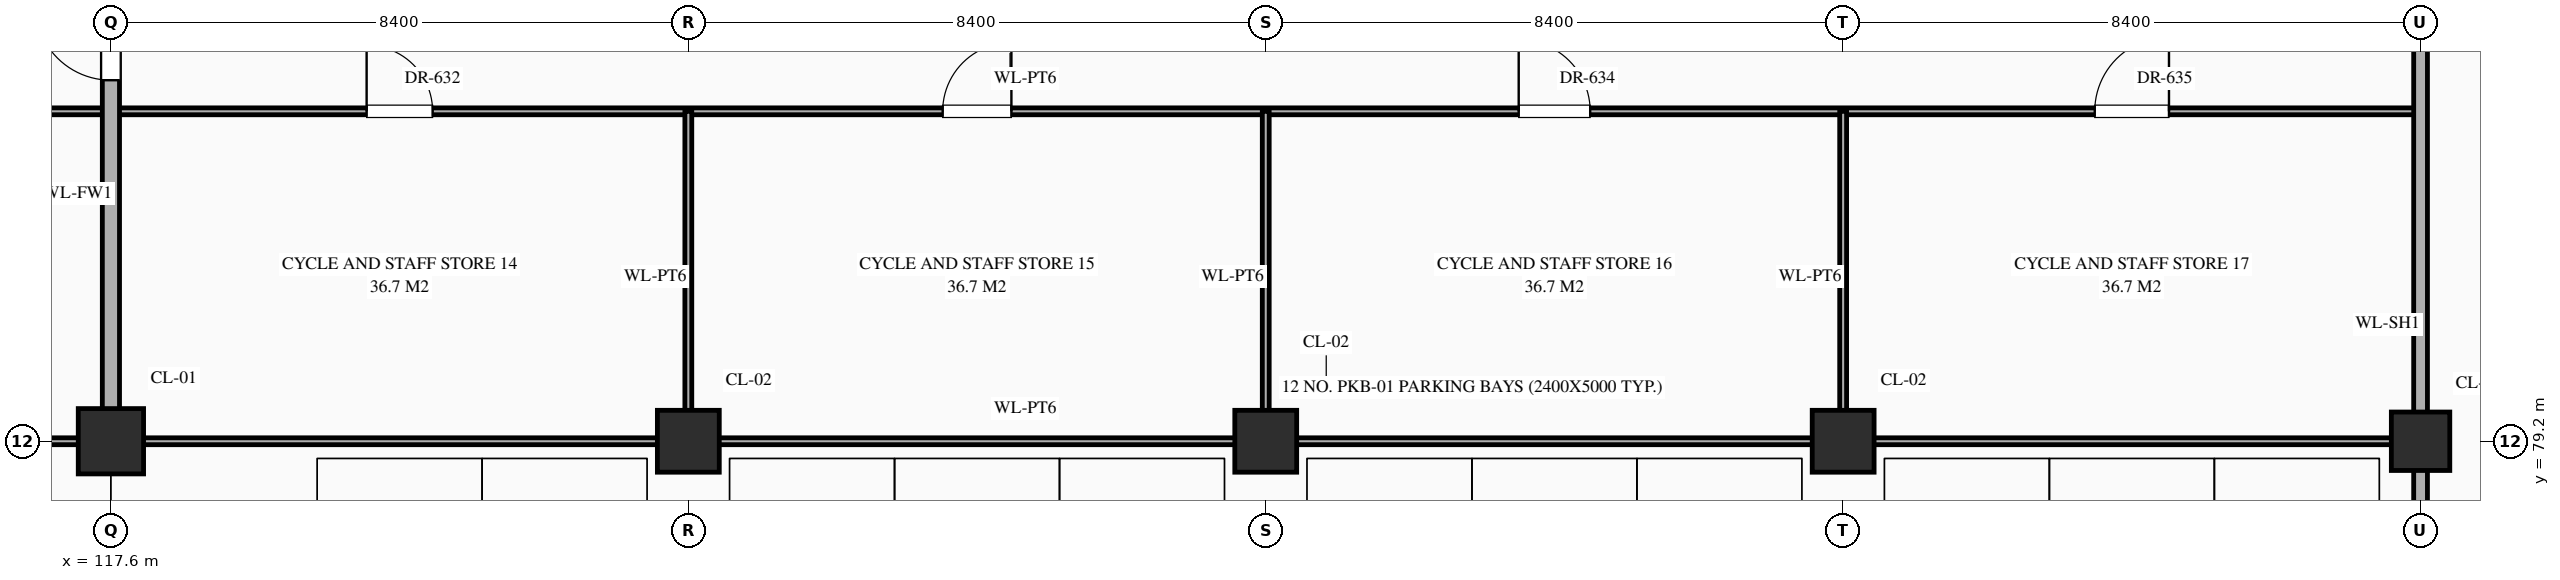
"""IFC4 building model, lengths in metres.
Left out: names, types, materials, properties, quantities, classifications, styles, units other than length and angle.
Written with IfcOpenShell. Run it as: python <this file> out.ifc"""

import sys

from ifc_helpers import new_model, si_unit, direction, frame, frame_2d, origin, origin_2d, place, context, subcontext, project, spatial, rectangle, extrude, element, fill, save


model = new_model("IFC4")
c1 = context("Model", 3, precision=1e-05, world=origin(), true_north=direction((0.0, 1.0)))
c2 = subcontext(c1, "Body", "Model", "MODEL_VIEW")
j1 = project(units=[si_unit("LENGTHUNIT", "METRE"), si_unit("PLANEANGLEUNIT", "RADIAN")], contexts=[c1])
p1 = place(None, origin())
s1 = spatial("IfcSite", under=j1, at=p1, CompositionType="ELEMENT")
p2 = place(p1, origin())
s2 = spatial("IfcBuilding", under=s1, at=p2, CompositionType="ELEMENT")
p3 = place(p2, frame((0.0, 0.0, -5.4)))
s3 = spatial("IfcBuildingStorey", under=s2, at=p3, CompositionType="ELEMENT", Elevation=-5.4)
p4 = place(p3, frame((117.6, 79.2, 0.0), z_axis=(0.0, 0.0, 1.0), x_axis=(1.0, 0.0, 0.0)))
e1 = element("IfcColumn", 1, at=p4, inside=s3, PredefinedType="COLUMN", context=c2, shape_type="SweptSolid", body=[
    extrude(rectangle(XDim=0.95, YDim=0.95, at=origin_2d()), origin(), (0.0, 0.0, 1.0), 5.4),
])
for number, where, z_axis, x_axis in (
    (2, (126.0, 79.2, 0.0), (0.0, 0.0, 1.0), (1.0, 0.0, 0.0)),
    (3, (134.4, 79.2, 0.0), (0.0, 0.0, 1.0), (1.0, 0.0, 0.0)),
    (4, (142.8, 79.2, 0.0), (0.0, 0.0, 1.0), (1.0, 0.0, 0.0)),
):
    element("IfcColumn", number, at=place(p3, frame(where, z_axis=z_axis, x_axis=x_axis)), inside=s3, PredefinedType="COLUMN", context=c2, shape_type="SweptSolid", body=[
        extrude(rectangle(XDim=0.9, YDim=0.9, at=origin_2d()), origin(), (0.0, 0.0, 1.0), 5.4),
    ])
p5 = place(p3, frame((151.2, 79.2, 0.0), z_axis=(0.0, 0.0, 1.0), x_axis=(1.0, 0.0, 0.0)))
e5 = element("IfcColumn", 5, at=p5, inside=s3, PredefinedType="COLUMN", context=c2, shape_type="SweptSolid", body=[
    extrude(rectangle(XDim=0.85, YDim=0.85, at=origin_2d()), origin(), (0.0, 0.0, 1.0), 5.4),
])
p6 = place(p3, frame((50.4, 79.2, 0.0), z_axis=(0.0, 0.0, 1.0), x_axis=(1.0, 0.0, 0.0)))
e6 = element("IfcWall", 6, at=p6, inside=s3, PredefinedType="STANDARD", context=c2, shape_type="SweptSolid", body=[
    extrude(rectangle(XDim=100.8, YDim=0.1, at=frame_2d((50.4, 0.0))), origin(), (0.0, 0.0, 1.0), 4.13),
])
p7 = place(p6, frame((28.76, 0.0, 0.0)))
e7 = element("IfcOpeningElement", 7, at=p7, cuts=e6, PredefinedType="OPENING", context=c2, shape_type="SweptSolid", body=[
    extrude(rectangle(XDim=1.28, YDim=2.35, at=frame_2d((0.64, 1.175))), frame((0.0, 0.062, 0.0), z_axis=(0.0, -1.0, 0.0), x_axis=(1.0, 0.0, 0.0)), (0.0, 0.0, 1.0), 0.124),
])
p8 = place(p3, frame((33.6, 84.0, 0.0), z_axis=(0.0, 0.0, 1.0), x_axis=(1.0, 0.0, 0.0)))
e8 = element("IfcWall", 8, at=p8, inside=s3, PredefinedType="STANDARD", context=c2, shape_type="SweptSolid", body=[
    extrude(rectangle(XDim=117.6, YDim=0.1, at=frame_2d((58.8, 0.0))), origin(), (0.0, 0.0, 1.0), 5.1),
])
p9 = place(p8, frame((3.66, 0.0, 0.0)))
e9 = element("IfcOpeningElement", 9, at=p9, cuts=e8, PredefinedType="OPENING", context=c2, shape_type="SweptSolid", body=[
    extrude(rectangle(XDim=1.08, YDim=2.25, at=frame_2d((0.54, 1.125))), frame((0.0, 0.062, 0.0), z_axis=(0.0, -1.0, 0.0), x_axis=(1.0, 0.0, 0.0)), (0.0, 0.0, 1.0), 0.124),
])
p10 = place(p8, frame((12.04, 0.0, 0.0)))
e10 = element("IfcOpeningElement", 10, at=p10, cuts=e8, PredefinedType="OPENING", context=c2, shape_type="SweptSolid", body=[
    extrude(rectangle(XDim=1.12, YDim=2.25, at=frame_2d((0.56, 1.125))), frame((0.0, 0.062, 0.0), z_axis=(0.0, -1.0, 0.0), x_axis=(1.0, 0.0, 0.0)), (0.0, 0.0, 1.0), 0.124),
])
p11 = place(p8, frame((20.4, 0.0, 0.0)))
e11 = element("IfcOpeningElement", 11, at=p11, cuts=e8, PredefinedType="OPENING", context=c2, shape_type="SweptSolid", body=[
    extrude(rectangle(XDim=1.2, YDim=2.35, at=frame_2d((0.6, 1.175))), frame((0.0, 0.062, 0.0), z_axis=(0.0, -1.0, 0.0), x_axis=(1.0, 0.0, 0.0)), (0.0, 0.0, 1.0), 0.124),
])
p12 = place(p8, frame((28.78, 0.0, 0.0)))
e12 = element("IfcOpeningElement", 12, at=p12, cuts=e8, PredefinedType="OPENING", context=c2, shape_type="SweptSolid", body=[
    extrude(rectangle(XDim=1.24, YDim=2.3, at=frame_2d((0.62, 1.15))), frame((0.0, 0.062, 0.0), z_axis=(0.0, -1.0, 0.0), x_axis=(1.0, 0.0, 0.0)), (0.0, 0.0, 1.0), 0.124),
])
p13 = place(p8, frame((37.16, 0.0, 0.0)))
e13 = element("IfcOpeningElement", 13, at=p13, cuts=e8, PredefinedType="OPENING", context=c2, shape_type="SweptSolid", body=[
    extrude(rectangle(XDim=1.28, YDim=2.35, at=frame_2d((0.64, 1.175))), frame((0.0, 0.062, 0.0), z_axis=(0.0, -1.0, 0.0), x_axis=(1.0, 0.0, 0.0)), (0.0, 0.0, 1.0), 0.124),
])
p14 = place(p8, frame((42.93, 0.0, 0.0)))
e14 = element("IfcOpeningElement", 14, at=p14, cuts=e8, PredefinedType="OPENING", context=c2, shape_type="SweptSolid", body=[
    extrude(rectangle(XDim=0.94, YDim=2.3, at=frame_2d((0.47, 1.15))), frame((0.0, 0.062, 0.0), z_axis=(0.0, -1.0, 0.0), x_axis=(1.0, 0.0, 0.0)), (0.0, 0.0, 1.0), 0.124),
])
p15 = place(p8, frame((45.71, 0.0, 0.0)))
e15 = element("IfcOpeningElement", 15, at=p15, cuts=e8, PredefinedType="OPENING", context=c2, shape_type="SweptSolid", body=[
    extrude(rectangle(XDim=0.98, YDim=2.35, at=frame_2d((0.49, 1.175))), frame((0.0, 0.062, 0.0), z_axis=(0.0, -1.0, 0.0), x_axis=(1.0, 0.0, 0.0)), (0.0, 0.0, 1.0), 0.124),
])
p16 = place(p8, frame((48.49, 0.0, 0.0)))
e16 = element("IfcOpeningElement", 16, at=p16, cuts=e8, PredefinedType="OPENING", context=c2, shape_type="SweptSolid", body=[
    extrude(rectangle(XDim=1.02, YDim=2.4, at=frame_2d((0.51, 1.2))), frame((0.0, 0.062, 0.0), z_axis=(0.0, -1.0, 0.0), x_axis=(1.0, 0.0, 0.0)), (0.0, 0.0, 1.0), 0.124),
])
p17 = place(p8, frame((54.03, 0.0, 0.0)))
e17 = element("IfcOpeningElement", 17, at=p17, cuts=e8, PredefinedType="OPENING", context=c2, shape_type="SweptSolid", body=[
    extrude(rectangle(XDim=1.14, YDim=2.4, at=frame_2d((0.57, 1.2))), frame((0.0, 0.062, 0.0), z_axis=(0.0, -1.0, 0.0), x_axis=(1.0, 0.0, 0.0)), (0.0, 0.0, 1.0), 0.124),
])
p18 = place(p8, frame((62.55, 0.0, 0.0)))
e18 = element("IfcOpeningElement", 18, at=p18, cuts=e8, PredefinedType="OPENING", context=c2, shape_type="SweptSolid", body=[
    extrude(rectangle(XDim=0.9, YDim=2.15, at=frame_2d((0.45, 1.075))), frame((0.0, 0.062, 0.0), z_axis=(0.0, -1.0, 0.0), x_axis=(1.0, 0.0, 0.0)), (0.0, 0.0, 1.0), 0.124),
])
p19 = place(p8, frame((70.97, 0.0, 0.0)))
e19 = element("IfcOpeningElement", 19, at=p19, cuts=e8, PredefinedType="OPENING", context=c2, shape_type="SweptSolid", body=[
    extrude(rectangle(XDim=0.86, YDim=2.1, at=frame_2d((0.43, 1.05))), frame((0.0, 0.062, 0.0), z_axis=(0.0, -1.0, 0.0), x_axis=(1.0, 0.0, 0.0)), (0.0, 0.0, 1.0), 0.124),
])
p20 = place(p8, frame((79.34, 0.0, 0.0)))
e20 = element("IfcOpeningElement", 20, at=p20, cuts=e8, PredefinedType="OPENING", context=c2, shape_type="SweptSolid", body=[
    extrude(rectangle(XDim=0.92, YDim=2.15, at=frame_2d((0.46, 1.075))), frame((0.0, 0.062, 0.0), z_axis=(0.0, -1.0, 0.0), x_axis=(1.0, 0.0, 0.0)), (0.0, 0.0, 1.0), 0.124),
])
p21 = place(p8, frame((87.72, 0.0, 0.0)))
e21 = element("IfcOpeningElement", 21, at=p21, cuts=e8, PredefinedType="OPENING", context=c2, shape_type="SweptSolid", body=[
    extrude(rectangle(XDim=0.96, YDim=2.2, at=frame_2d((0.48, 1.1))), frame((0.0, 0.062, 0.0), z_axis=(0.0, -1.0, 0.0), x_axis=(1.0, 0.0, 0.0)), (0.0, 0.0, 1.0), 0.124),
])
p22 = place(p8, frame((96.1, 0.0, 0.0)))
e22 = element("IfcOpeningElement", 22, at=p22, cuts=e8, PredefinedType="OPENING", context=c2, shape_type="SweptSolid", body=[
    extrude(rectangle(XDim=1.0, YDim=2.25, at=frame_2d((0.5, 1.125))), frame((0.0, 0.062, 0.0), z_axis=(0.0, -1.0, 0.0), x_axis=(1.0, 0.0, 0.0)), (0.0, 0.0, 1.0), 0.124),
])
p23 = place(p8, frame((104.48, 0.0, 0.0)))
e23 = element("IfcOpeningElement", 23, at=p23, cuts=e8, PredefinedType="OPENING", context=c2, shape_type="SweptSolid", body=[
    extrude(rectangle(XDim=1.04, YDim=2.2, at=frame_2d((0.52, 1.1))), frame((0.0, 0.062, 0.0), z_axis=(0.0, -1.0, 0.0), x_axis=(1.0, 0.0, 0.0)), (0.0, 0.0, 1.0), 0.124),
])
p24 = place(p8, frame((112.86, 0.0, 0.0)))
e24 = element("IfcOpeningElement", 24, at=p24, cuts=e8, PredefinedType="OPENING", context=c2, shape_type="SweptSolid", body=[
    extrude(rectangle(XDim=1.08, YDim=2.25, at=frame_2d((0.54, 1.125))), frame((0.0, 0.062, 0.0), z_axis=(0.0, -1.0, 0.0), x_axis=(1.0, 0.0, 0.0)), (0.0, 0.0, 1.0), 0.124),
])
p25 = place(p3, frame((117.6, 79.2, 0.0), z_axis=(0.0, 0.0, 1.0), x_axis=(0.0, 1.0, 0.0)))
e25 = element("IfcWall", 25, at=p25, inside=s3, PredefinedType="STANDARD", context=c2, shape_type="SweptSolid", body=[
    extrude(rectangle(XDim=7.2, YDim=0.25, at=frame_2d((3.6, 0.0))), origin(), (0.0, 0.0, 1.0), 4.35),
])
p26 = place(p25, frame((5.252, 0.0, 0.0)))
e26 = element("IfcOpeningElement", 26, at=p26, cuts=e25, PredefinedType="OPENING", context=c2, shape_type="SweptSolid", body=[
    extrude(rectangle(XDim=1.1, YDim=2.2, at=frame_2d((0.55, 1.1))), frame((0.0, 0.137, 0.0), z_axis=(0.0, -1.0, 0.0), x_axis=(1.0, 0.0, 0.0)), (0.0, 0.0, 1.0), 0.274),
])
for number, where, z_axis, x_axis in (
    (27, (126.0, 79.2, 0.0), (0.0, 0.0, 1.0), (0.0, 1.0, 0.0)),
    (28, (134.4, 79.2, 0.0), (0.0, 0.0, 1.0), (0.0, 1.0, 0.0)),
    (29, (142.8, 79.2, 0.0), (0.0, 0.0, 1.0), (0.0, 1.0, 0.0)),
):
    element("IfcWall", number, at=place(p3, frame(where, z_axis=z_axis, x_axis=x_axis)), inside=s3, PredefinedType="STANDARD", context=c2, shape_type="SweptSolid", body=[
        extrude(rectangle(XDim=4.8, YDim=0.1, at=frame_2d((2.4, 0.0))), origin(), (0.0, 0.0, 1.0), 4.35),
    ])
p27 = place(p3, frame((151.2, 64.8, 0.0), z_axis=(0.0, 0.0, 1.0), x_axis=(0.0, 1.0, 0.0)))
e30 = element("IfcWall", 30, at=p27, inside=s3, PredefinedType="STANDARD", context=c2, shape_type="SweptSolid", body=[
    extrude(rectangle(XDim=21.6, YDim=0.2, at=frame_2d((10.8, 0.0))), origin(), (0.0, 0.0, 1.0), 4.23),
])
p28 = place(p26, origin())
e31 = element("IfcDoor", 31, at=p28, inside=s3, OperationType="SINGLE_SWING_RIGHT", PredefinedType="DOOR", context=c2, shape_type="SweptSolid", body=[
    extrude(rectangle(XDim=1.1, YDim=2.2, at=frame_2d((0.55, 1.1))), frame((0.0, 0.025, 0.0), z_axis=(0.0, -1.0, 0.0), x_axis=(1.0, 0.0, 0.0)), (0.0, 0.0, 1.0), 0.05),
])
fill(e26, e31)
p29 = place(p21, origin())
e32 = element("IfcDoor", 32, at=p29, inside=s3, OperationType="SINGLE_SWING_LEFT", PredefinedType="DOOR", context=c2, shape_type="SweptSolid", body=[
    extrude(rectangle(XDim=0.96, YDim=2.2, at=frame_2d((0.48, 1.1))), frame((0.0, 0.025, 0.0), z_axis=(0.0, -1.0, 0.0), x_axis=(1.0, 0.0, 0.0)), (0.0, 0.0, 1.0), 0.05),
])
fill(e21, e32)
p30 = place(p22, origin())
e33 = element("IfcDoor", 33, at=p30, inside=s3, OperationType="SINGLE_SWING_RIGHT", PredefinedType="DOOR", context=c2, shape_type="SweptSolid", body=[
    extrude(rectangle(XDim=1.0, YDim=2.25, at=frame_2d((0.5, 1.125))), frame((0.0, 0.025, 0.0), z_axis=(0.0, -1.0, 0.0), x_axis=(1.0, 0.0, 0.0)), (0.0, 0.0, 1.0), 0.05),
])
fill(e22, e33)
p31 = place(p23, origin())
e34 = element("IfcDoor", 34, at=p31, inside=s3, OperationType="SINGLE_SWING_LEFT", PredefinedType="DOOR", context=c2, shape_type="SweptSolid", body=[
    extrude(rectangle(XDim=1.04, YDim=2.2, at=frame_2d((0.52, 1.1))), frame((0.0, 0.025, 0.0), z_axis=(0.0, -1.0, 0.0), x_axis=(1.0, 0.0, 0.0)), (0.0, 0.0, 1.0), 0.05),
])
fill(e23, e34)
p32 = place(p24, origin())
e35 = element("IfcDoor", 35, at=p32, inside=s3, OperationType="SINGLE_SWING_RIGHT", PredefinedType="DOOR", context=c2, shape_type="SweptSolid", body=[
    extrude(rectangle(XDim=1.08, YDim=2.25, at=frame_2d((0.54, 1.125))), frame((0.0, 0.025, 0.0), z_axis=(0.0, -1.0, 0.0), x_axis=(1.0, 0.0, 0.0)), (0.0, 0.0, 1.0), 0.05),
])
fill(e24, e35)
save(model, sys.argv[1])
